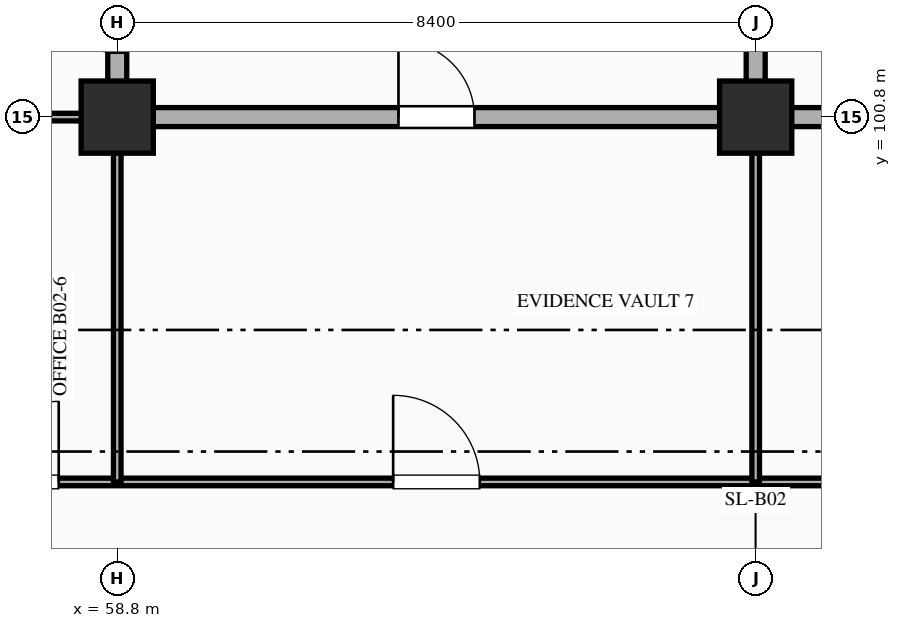
"""IFC4 building model, lengths in metres.
Left out: names, types, materials, properties, quantities, classifications, styles, units other than length and angle.
Written with IfcOpenShell. Run it as: python <this file> out.ifc"""

import sys

from ifc_helpers import new_model, si_unit, direction, frame, frame_2d, origin, origin_2d, place, context, subcontext, project, spatial, rectangle, extrude, element, fill, save


model = new_model("IFC4")
c1 = context("Model", 3, precision=1e-05, world=origin(), true_north=direction((0.0, 1.0)))
c2 = subcontext(c1, "Body", "Model", "MODEL_VIEW")
j1 = project(units=[si_unit("LENGTHUNIT", "METRE"), si_unit("PLANEANGLEUNIT", "RADIAN")], contexts=[c1])
p1 = place(None, origin())
s1 = spatial("IfcSite", under=j1, at=p1, CompositionType="ELEMENT")
p2 = place(p1, origin())
s2 = spatial("IfcBuilding", under=s1, at=p2, CompositionType="ELEMENT")
p3 = place(p2, frame((0.0, 0.0, -10.2)))
s3 = spatial("IfcBuildingStorey", under=s2, at=p3, CompositionType="ELEMENT", Elevation=-10.2)
for number, where, z_axis, x_axis in (
    (1, (58.8, 100.8, 0.0), (0.0, 0.0, 1.0), (1.0, 0.0, 0.0)),
    (2, (67.2, 100.8, 0.0), (0.0, 0.0, 1.0), (1.0, 0.0, 0.0)),
):
    element("IfcColumn", number, at=place(p3, frame(where, z_axis=z_axis, x_axis=x_axis)), inside=s3, PredefinedType="COLUMN", context=c2, shape_type="SweptSolid", body=[
        extrude(rectangle(XDim=0.95, YDim=0.95, at=origin_2d()), origin(), (0.0, 0.0, 1.0), 4.8),
    ])
p4 = place(p3, frame((0.04, 96.0, 0.0), z_axis=(0.0, 0.0, 1.0), x_axis=(1.0, 0.0, 0.0)))
e3 = element("IfcWall", 3, at=p4, inside=s3, PredefinedType="STANDARD", context=c2, shape_type="SweptSolid", body=[
    extrude(rectangle(XDim=151.16, YDim=0.1, at=frame_2d((75.58, 0.0))), origin(), (0.0, 0.0, 1.0), 4.48),
])
p5 = place(p4, frame((1.04, 0.0, 0.0)))
e4 = element("IfcOpeningElement", 4, at=p5, cuts=e3, PredefinedType="OPENING", context=c2, shape_type="SweptSolid", body=[
    extrude(rectangle(XDim=1.28, YDim=2.35, at=frame_2d((0.64, 1.175))), frame((0.0, 0.062, 0.0), z_axis=(0.0, -1.0, 0.0), x_axis=(1.0, 0.0, 0.0)), (0.0, 0.0, 1.0), 0.124),
])
p6 = place(p4, frame((4.09, 0.0, 0.0)))
e5 = element("IfcOpeningElement", 5, at=p6, cuts=e3, PredefinedType="OPENING", context=c2, shape_type="SweptSolid", body=[
    extrude(rectangle(XDim=0.94, YDim=2.3, at=frame_2d((0.47, 1.15))), frame((0.0, 0.062, 0.0), z_axis=(0.0, -1.0, 0.0), x_axis=(1.0, 0.0, 0.0)), (0.0, 0.0, 1.0), 0.124),
])
p7 = place(p4, frame((6.57, 0.0, 0.0)))
e6 = element("IfcOpeningElement", 6, at=p7, cuts=e3, PredefinedType="OPENING", context=c2, shape_type="SweptSolid", body=[
    extrude(rectangle(XDim=0.98, YDim=2.35, at=frame_2d((0.49, 1.175))), frame((0.0, 0.062, 0.0), z_axis=(0.0, -1.0, 0.0), x_axis=(1.0, 0.0, 0.0)), (0.0, 0.0, 1.0), 0.124),
])
p8 = place(p4, frame((12.05, 0.0, 0.0)))
e7 = element("IfcOpeningElement", 7, at=p8, cuts=e3, PredefinedType="OPENING", context=c2, shape_type="SweptSolid", body=[
    extrude(rectangle(XDim=1.02, YDim=2.4, at=frame_2d((0.51, 1.2))), frame((0.0, 0.062, 0.0), z_axis=(0.0, -1.0, 0.0), x_axis=(1.0, 0.0, 0.0)), (0.0, 0.0, 1.0), 0.124),
])
p9 = place(p4, frame((20.43, 0.0, 0.0)))
e8 = element("IfcOpeningElement", 8, at=p9, cuts=e3, PredefinedType="OPENING", context=c2, shape_type="SweptSolid", body=[
    extrude(rectangle(XDim=1.06, YDim=2.4, at=frame_2d((0.53, 1.2))), frame((0.0, 0.062, 0.0), z_axis=(0.0, -1.0, 0.0), x_axis=(1.0, 0.0, 0.0)), (0.0, 0.0, 1.0), 0.124),
])
p10 = place(p4, frame((26.29, 0.0, 0.0)))
e9 = element("IfcOpeningElement", 9, at=p10, cuts=e3, PredefinedType="OPENING", context=c2, shape_type="SweptSolid", body=[
    extrude(rectangle(XDim=1.14, YDim=2.4, at=frame_2d((0.57, 1.2))), frame((0.0, 0.062, 0.0), z_axis=(0.0, -1.0, 0.0), x_axis=(1.0, 0.0, 0.0)), (0.0, 0.0, 1.0), 0.124),
])
p11 = place(p4, frame((29.31, 0.0, 0.0)))
e10 = element("IfcOpeningElement", 10, at=p11, cuts=e3, PredefinedType="OPENING", context=c2, shape_type="SweptSolid", body=[
    extrude(rectangle(XDim=0.9, YDim=2.15, at=frame_2d((0.45, 1.075))), frame((0.0, 0.062, 0.0), z_axis=(0.0, -1.0, 0.0), x_axis=(1.0, 0.0, 0.0)), (0.0, 0.0, 1.0), 0.124),
])
p12 = place(p4, frame((31.83, 0.0, 0.0)))
e11 = element("IfcOpeningElement", 11, at=p12, cuts=e3, PredefinedType="OPENING", context=c2, shape_type="SweptSolid", body=[
    extrude(rectangle(XDim=0.86, YDim=2.1, at=frame_2d((0.43, 1.05))), frame((0.0, 0.062, 0.0), z_axis=(0.0, -1.0, 0.0), x_axis=(1.0, 0.0, 0.0)), (0.0, 0.0, 1.0), 0.124),
])
p13 = place(p4, frame((37.3, 0.0, 0.0)))
e12 = element("IfcOpeningElement", 12, at=p13, cuts=e3, PredefinedType="OPENING", context=c2, shape_type="SweptSolid", body=[
    extrude(rectangle(XDim=0.92, YDim=2.15, at=frame_2d((0.46, 1.075))), frame((0.0, 0.062, 0.0), z_axis=(0.0, -1.0, 0.0), x_axis=(1.0, 0.0, 0.0)), (0.0, 0.0, 1.0), 0.124),
])
p14 = place(p4, frame((45.68, 0.0, 0.0)))
e13 = element("IfcOpeningElement", 13, at=p14, cuts=e3, PredefinedType="OPENING", context=c2, shape_type="SweptSolid", body=[
    extrude(rectangle(XDim=0.96, YDim=2.2, at=frame_2d((0.48, 1.1))), frame((0.0, 0.062, 0.0), z_axis=(0.0, -1.0, 0.0), x_axis=(1.0, 0.0, 0.0)), (0.0, 0.0, 1.0), 0.124),
])
p15 = place(p4, frame((51.57, 0.0, 0.0)))
e14 = element("IfcOpeningElement", 14, at=p15, cuts=e3, PredefinedType="OPENING", context=c2, shape_type="SweptSolid", body=[
    extrude(rectangle(XDim=0.98, YDim=2.35, at=frame_2d((0.49, 1.175))), frame((0.0, 0.062, 0.0), z_axis=(0.0, -1.0, 0.0), x_axis=(1.0, 0.0, 0.0)), (0.0, 0.0, 1.0), 0.124),
])
p16 = place(p4, frame((54.45, 0.0, 0.0)))
e15 = element("IfcOpeningElement", 15, at=p16, cuts=e3, PredefinedType="OPENING", context=c2, shape_type="SweptSolid", body=[
    extrude(rectangle(XDim=1.02, YDim=2.4, at=frame_2d((0.51, 1.2))), frame((0.0, 0.062, 0.0), z_axis=(0.0, -1.0, 0.0), x_axis=(1.0, 0.0, 0.0)), (0.0, 0.0, 1.0), 0.124),
])
p17 = place(p4, frame((56.93, 0.0, 0.0)))
e16 = element("IfcOpeningElement", 16, at=p17, cuts=e3, PredefinedType="OPENING", context=c2, shape_type="SweptSolid", body=[
    extrude(rectangle(XDim=1.06, YDim=2.4, at=frame_2d((0.53, 1.2))), frame((0.0, 0.062, 0.0), z_axis=(0.0, -1.0, 0.0), x_axis=(1.0, 0.0, 0.0)), (0.0, 0.0, 1.0), 0.124),
])
p18 = place(p4, frame((62.39, 0.0, 0.0)))
e17 = element("IfcOpeningElement", 17, at=p18, cuts=e3, PredefinedType="OPENING", context=c2, shape_type="SweptSolid", body=[
    extrude(rectangle(XDim=1.14, YDim=2.4, at=frame_2d((0.57, 1.2))), frame((0.0, 0.062, 0.0), z_axis=(0.0, -1.0, 0.0), x_axis=(1.0, 0.0, 0.0)), (0.0, 0.0, 1.0), 0.124),
])
p19 = place(p4, frame((70.91, 0.0, 0.0)))
e18 = element("IfcOpeningElement", 18, at=p19, cuts=e3, PredefinedType="OPENING", context=c2, shape_type="SweptSolid", body=[
    extrude(rectangle(XDim=0.9, YDim=2.15, at=frame_2d((0.45, 1.075))), frame((0.0, 0.062, 0.0), z_axis=(0.0, -1.0, 0.0), x_axis=(1.0, 0.0, 0.0)), (0.0, 0.0, 1.0), 0.124),
])
p20 = place(p4, frame((79.33, 0.0, 0.0)))
e19 = element("IfcOpeningElement", 19, at=p20, cuts=e3, PredefinedType="OPENING", context=c2, shape_type="SweptSolid", body=[
    extrude(rectangle(XDim=0.86, YDim=2.1, at=frame_2d((0.43, 1.05))), frame((0.0, 0.062, 0.0), z_axis=(0.0, -1.0, 0.0), x_axis=(1.0, 0.0, 0.0)), (0.0, 0.0, 1.0), 0.124),
])
p21 = place(p4, frame((85.1, 0.0, 0.0)))
e20 = element("IfcOpeningElement", 20, at=p21, cuts=e3, PredefinedType="OPENING", context=c2, shape_type="SweptSolid", body=[
    extrude(rectangle(XDim=1.12, YDim=2.25, at=frame_2d((0.56, 1.125))), frame((0.0, 0.062, 0.0), z_axis=(0.0, -1.0, 0.0), x_axis=(1.0, 0.0, 0.0)), (0.0, 0.0, 1.0), 0.124),
])
p22 = place(p4, frame((87.98, 0.0, 0.0)))
e21 = element("IfcOpeningElement", 21, at=p22, cuts=e3, PredefinedType="OPENING", context=c2, shape_type="SweptSolid", body=[
    extrude(rectangle(XDim=1.16, YDim=2.3, at=frame_2d((0.58, 1.15))), frame((0.0, 0.062, 0.0), z_axis=(0.0, -1.0, 0.0), x_axis=(1.0, 0.0, 0.0)), (0.0, 0.0, 1.0), 0.124),
])
p23 = place(p4, frame((90.46, 0.0, 0.0)))
e22 = element("IfcOpeningElement", 22, at=p23, cuts=e3, PredefinedType="OPENING", context=c2, shape_type="SweptSolid", body=[
    extrude(rectangle(XDim=1.2, YDim=2.35, at=frame_2d((0.6, 1.175))), frame((0.0, 0.062, 0.0), z_axis=(0.0, -1.0, 0.0), x_axis=(1.0, 0.0, 0.0)), (0.0, 0.0, 1.0), 0.124),
])
p24 = place(p4, frame((95.94, 0.0, 0.0)))
e23 = element("IfcOpeningElement", 23, at=p24, cuts=e3, PredefinedType="OPENING", context=c2, shape_type="SweptSolid", body=[
    extrude(rectangle(XDim=1.24, YDim=2.3, at=frame_2d((0.62, 1.15))), frame((0.0, 0.062, 0.0), z_axis=(0.0, -1.0, 0.0), x_axis=(1.0, 0.0, 0.0)), (0.0, 0.0, 1.0), 0.124),
])
p25 = place(p4, frame((104.32, 0.0, 0.0)))
e24 = element("IfcOpeningElement", 24, at=p25, cuts=e3, PredefinedType="OPENING", context=c2, shape_type="SweptSolid", body=[
    extrude(rectangle(XDim=1.28, YDim=2.35, at=frame_2d((0.64, 1.175))), frame((0.0, 0.062, 0.0), z_axis=(0.0, -1.0, 0.0), x_axis=(1.0, 0.0, 0.0)), (0.0, 0.0, 1.0), 0.124),
])
p26 = place(p4, frame((110.39, 0.0, 0.0)))
e25 = element("IfcOpeningElement", 25, at=p26, cuts=e3, PredefinedType="OPENING", context=c2, shape_type="SweptSolid", body=[
    extrude(rectangle(XDim=0.94, YDim=2.3, at=frame_2d((0.47, 1.15))), frame((0.0, 0.062, 0.0), z_axis=(0.0, -1.0, 0.0), x_axis=(1.0, 0.0, 0.0)), (0.0, 0.0, 1.0), 0.124),
])
p27 = place(p4, frame((113.27, 0.0, 0.0)))
e26 = element("IfcOpeningElement", 26, at=p27, cuts=e3, PredefinedType="OPENING", context=c2, shape_type="SweptSolid", body=[
    extrude(rectangle(XDim=0.98, YDim=2.35, at=frame_2d((0.49, 1.175))), frame((0.0, 0.062, 0.0), z_axis=(0.0, -1.0, 0.0), x_axis=(1.0, 0.0, 0.0)), (0.0, 0.0, 1.0), 0.124),
])
p28 = place(p4, frame((115.75, 0.0, 0.0)))
e27 = element("IfcOpeningElement", 27, at=p28, cuts=e3, PredefinedType="OPENING", context=c2, shape_type="SweptSolid", body=[
    extrude(rectangle(XDim=1.02, YDim=2.4, at=frame_2d((0.51, 1.2))), frame((0.0, 0.062, 0.0), z_axis=(0.0, -1.0, 0.0), x_axis=(1.0, 0.0, 0.0)), (0.0, 0.0, 1.0), 0.124),
])
p29 = place(p4, frame((121.24, 0.0, 0.0)))
e28 = element("IfcOpeningElement", 28, at=p29, cuts=e3, PredefinedType="OPENING", context=c2, shape_type="SweptSolid", body=[
    extrude(rectangle(XDim=1.04, YDim=2.2, at=frame_2d((0.52, 1.1))), frame((0.0, 0.062, 0.0), z_axis=(0.0, -1.0, 0.0), x_axis=(1.0, 0.0, 0.0)), (0.0, 0.0, 1.0), 0.124),
])
p30 = place(p4, frame((129.62, 0.0, 0.0)))
e29 = element("IfcOpeningElement", 29, at=p30, cuts=e3, PredefinedType="OPENING", context=c2, shape_type="SweptSolid", body=[
    extrude(rectangle(XDim=1.08, YDim=2.25, at=frame_2d((0.54, 1.125))), frame((0.0, 0.062, 0.0), z_axis=(0.0, -1.0, 0.0), x_axis=(1.0, 0.0, 0.0)), (0.0, 0.0, 1.0), 0.124),
])
p31 = place(p4, frame((135.5, 0.0, 0.0)))
e30 = element("IfcOpeningElement", 30, at=p31, cuts=e3, PredefinedType="OPENING", context=c2, shape_type="SweptSolid", body=[
    extrude(rectangle(XDim=1.12, YDim=2.25, at=frame_2d((0.56, 1.125))), frame((0.0, 0.062, 0.0), z_axis=(0.0, -1.0, 0.0), x_axis=(1.0, 0.0, 0.0)), (0.0, 0.0, 1.0), 0.124),
])
p32 = place(p4, frame((138.38, 0.0, 0.0)))
e31 = element("IfcOpeningElement", 31, at=p32, cuts=e3, PredefinedType="OPENING", context=c2, shape_type="SweptSolid", body=[
    extrude(rectangle(XDim=1.16, YDim=2.3, at=frame_2d((0.58, 1.15))), frame((0.0, 0.062, 0.0), z_axis=(0.0, -1.0, 0.0), x_axis=(1.0, 0.0, 0.0)), (0.0, 0.0, 1.0), 0.124),
])
p33 = place(p4, frame((140.86, 0.0, 0.0)))
e32 = element("IfcOpeningElement", 32, at=p33, cuts=e3, PredefinedType="OPENING", context=c2, shape_type="SweptSolid", body=[
    extrude(rectangle(XDim=1.2, YDim=2.35, at=frame_2d((0.6, 1.175))), frame((0.0, 0.062, 0.0), z_axis=(0.0, -1.0, 0.0), x_axis=(1.0, 0.0, 0.0)), (0.0, 0.0, 1.0), 0.124),
])
p34 = place(p4, frame((146.34, 0.0, 0.0)))
e33 = element("IfcOpeningElement", 33, at=p34, cuts=e3, PredefinedType="OPENING", context=c2, shape_type="SweptSolid", body=[
    extrude(rectangle(XDim=1.24, YDim=2.3, at=frame_2d((0.62, 1.15))), frame((0.0, 0.062, 0.0), z_axis=(0.0, -1.0, 0.0), x_axis=(1.0, 0.0, 0.0)), (0.0, 0.0, 1.0), 0.124),
])
p35 = place(p3, frame((46.2, 100.8, 0.0), z_axis=(0.0, 0.0, 1.0), x_axis=(1.0, 0.0, 0.0)))
e34 = element("IfcWall", 34, at=p35, inside=s3, PredefinedType="STANDARD", context=c2, shape_type="SweptSolid", body=[
    extrude(rectangle(XDim=12.6, YDim=0.1, at=frame_2d((6.3, 0.0))), origin(), (0.0, 0.0, 1.0), 3.63),
])
p36 = place(p35, frame((1.343, 0.0, 0.0)))
e35 = element("IfcOpeningElement", 35, at=p36, cuts=e34, PredefinedType="OPENING", context=c2, shape_type="SweptSolid", body=[
    extrude(rectangle(XDim=1.12, YDim=2.25, at=frame_2d((0.56, 1.125))), frame((0.0, 0.062, 0.0), z_axis=(0.0, -1.0, 0.0), x_axis=(1.0, 0.0, 0.0)), (0.0, 0.0, 1.0), 0.124),
])
p37 = place(p35, frame((5.667, 0.0, 0.0)))
e36 = element("IfcOpeningElement", 36, at=p37, cuts=e34, PredefinedType="OPENING", context=c2, shape_type="SweptSolid", body=[
    extrude(rectangle(XDim=0.86, YDim=2.1, at=frame_2d((0.43, 1.05))), frame((0.0, 0.062, 0.0), z_axis=(0.0, -1.0, 0.0), x_axis=(1.0, 0.0, 0.0)), (0.0, 0.0, 1.0), 0.124),
])
p38 = place(p35, frame((8.34, 0.0, 0.0)))
e37 = element("IfcOpeningElement", 37, at=p38, cuts=e34, PredefinedType="OPENING", context=c2, shape_type="SweptSolid", body=[
    extrude(rectangle(XDim=0.92, YDim=2.15, at=frame_2d((0.46, 1.075))), frame((0.0, 0.062, 0.0), z_axis=(0.0, -1.0, 0.0), x_axis=(1.0, 0.0, 0.0)), (0.0, 0.0, 1.0), 0.124),
])
p39 = place(p35, frame((10.623, 0.0, 0.0)))
e38 = element("IfcOpeningElement", 38, at=p39, cuts=e34, PredefinedType="OPENING", context=c2, shape_type="SweptSolid", body=[
    extrude(rectangle(XDim=0.96, YDim=2.2, at=frame_2d((0.48, 1.1))), frame((0.0, 0.062, 0.0), z_axis=(0.0, -1.0, 0.0), x_axis=(1.0, 0.0, 0.0)), (0.0, 0.0, 1.0), 0.124),
])
p40 = place(p3, frame((58.8, 100.8, 0.0), z_axis=(0.0, 0.0, 1.0), x_axis=(1.0, 0.0, 0.0)))
e39 = element("IfcWall", 39, at=p40, inside=s3, PredefinedType="STANDARD", context=c2, shape_type="SweptSolid", body=[
    extrude(rectangle(XDim=12.6, YDim=0.25, at=frame_2d((6.3, 0.0))), origin(), (0.0, 0.0, 1.0), 3.63),
])
p41 = place(p40, frame((3.7, 0.0, 0.0)))
e40 = element("IfcOpeningElement", 40, at=p41, cuts=e39, PredefinedType="OPENING", context=c2, shape_type="SweptSolid", body=[
    extrude(rectangle(XDim=1.0, YDim=2.2, at=frame_2d((0.5, 1.1))), frame((0.0, 0.137, 0.0), z_axis=(0.0, -1.0, 0.0), x_axis=(1.0, 0.0, 0.0)), (0.0, 0.0, 1.0), 0.274),
])
p42 = place(p3, frame((58.8, 96.0, 0.0), z_axis=(0.0, 0.0, 1.0), x_axis=(0.0, 1.0, 0.0)))
e41 = element("IfcWall", 41, at=p42, inside=s3, PredefinedType="STANDARD", context=c2, shape_type="SweptSolid", body=[
    extrude(rectangle(XDim=4.8, YDim=0.1, at=frame_2d((2.4, 0.0))), origin(), (0.0, 0.0, 1.0), 3.73),
])
p43 = place(p3, frame((58.8, 100.8, 0.0), z_axis=(0.0, 0.0, 1.0), x_axis=(0.0, 1.0, 0.0)))
e42 = element("IfcWall", 42, at=p43, inside=s3, PredefinedType="STANDARD", context=c2, shape_type="SweptSolid", body=[
    extrude(rectangle(XDim=2.4, YDim=0.25, at=frame_2d((1.2, 0.0))), origin(), (0.0, 0.0, 1.0), 3.73),
])
p44 = place(p43, frame((0.847, 0.0, 0.0)))
e43 = element("IfcOpeningElement", 43, at=p44, cuts=e42, PredefinedType="OPENING", context=c2, shape_type="SweptSolid", body=[
    extrude(rectangle(XDim=1.1, YDim=2.2, at=frame_2d((0.55, 1.1))), frame((0.0, 0.137, 0.0), z_axis=(0.0, -1.0, 0.0), x_axis=(1.0, 0.0, 0.0)), (0.0, 0.0, 1.0), 0.274),
])
p45 = place(p3, frame((67.2, 96.0, 0.0), z_axis=(0.0, 0.0, 1.0), x_axis=(0.0, 1.0, 0.0)))
e44 = element("IfcWall", 44, at=p45, inside=s3, PredefinedType="STANDARD", context=c2, shape_type="SweptSolid", body=[
    extrude(rectangle(XDim=4.8, YDim=0.1, at=frame_2d((2.4, 0.0))), origin(), (0.0, 0.0, 1.0), 3.73),
])
p46 = place(p3, frame((67.2, 100.8, 0.0), z_axis=(0.0, 0.0, 1.0), x_axis=(0.0, 1.0, 0.0)))
e45 = element("IfcWall", 45, at=p46, inside=s3, PredefinedType="STANDARD", context=c2, shape_type="SweptSolid", body=[
    extrude(rectangle(XDim=2.4, YDim=0.25, at=frame_2d((1.2, 0.0))), origin(), (0.0, 0.0, 1.0), 3.73),
])
p47 = place(p46, frame((0.923, 0.0, 0.0)))
e46 = element("IfcOpeningElement", 46, at=p47, cuts=e45, PredefinedType="OPENING", context=c2, shape_type="SweptSolid", body=[
    extrude(rectangle(XDim=0.95, YDim=2.15, at=frame_2d((0.475, 1.075))), frame((0.0, 0.137, 0.0), z_axis=(0.0, -1.0, 0.0), x_axis=(1.0, 0.0, 0.0)), (0.0, 0.0, 1.0), 0.274),
])
p48 = place(p44, origin())
e47 = element("IfcDoor", 47, at=p48, inside=s3, OperationType="SINGLE_SWING_RIGHT", PredefinedType="DOOR", context=c2, shape_type="SweptSolid", body=[
    extrude(rectangle(XDim=1.1, YDim=2.2, at=frame_2d((0.55, 1.1))), frame((0.0, 0.025, 0.0), z_axis=(0.0, -1.0, 0.0), x_axis=(1.0, 0.0, 0.0)), (0.0, 0.0, 1.0), 0.05),
])
fill(e43, e47)
p49 = place(p41, origin())
e48 = element("IfcDoor", 48, at=p49, inside=s3, OperationType="SINGLE_SWING_LEFT", PredefinedType="DOOR", context=c2, shape_type="SweptSolid", body=[
    extrude(rectangle(XDim=1.0, YDim=2.2, at=frame_2d((0.5, 1.1))), frame((0.0, 0.025, 0.0), z_axis=(0.0, -1.0, 0.0), x_axis=(1.0, 0.0, 0.0)), (0.0, 0.0, 1.0), 0.05),
])
fill(e40, e48)
p50 = place(p17, origin())
e49 = element("IfcDoor", 49, at=p50, inside=s3, OperationType="SINGLE_SWING_RIGHT", PredefinedType="DOOR", context=c2, shape_type="SweptSolid", body=[
    extrude(rectangle(XDim=1.06, YDim=2.4, at=frame_2d((0.53, 1.2))), frame((0.0, 0.025, 0.0), z_axis=(0.0, -1.0, 0.0), x_axis=(1.0, 0.0, 0.0)), (0.0, 0.0, 1.0), 0.05),
])
fill(e16, e49)
p51 = place(p18, origin())
e50 = element("IfcDoor", 50, at=p51, inside=s3, OperationType="SINGLE_SWING_LEFT", PredefinedType="DOOR", context=c2, shape_type="SweptSolid", body=[
    extrude(rectangle(XDim=1.14, YDim=2.4, at=frame_2d((0.57, 1.2))), frame((0.0, 0.025, 0.0), z_axis=(0.0, -1.0, 0.0), x_axis=(1.0, 0.0, 0.0)), (0.0, 0.0, 1.0), 0.05),
])
fill(e17, e50)
save(model, sys.argv[1])
